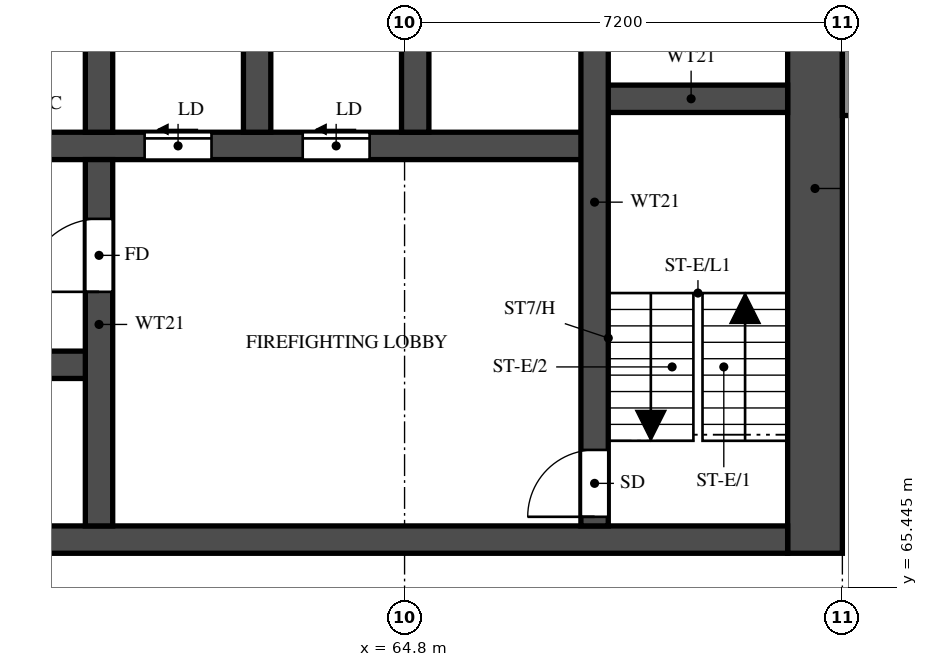
"""IFC4 building model, lengths in metres.
Left out: names, types, materials, properties, quantities, classifications, styles, units other than length and angle.
Written with IfcOpenShell. Run it as: python <this file> out.ifc"""

import sys

from ifc_helpers import new_model, si_unit, direction, frame, frame_2d, origin, place, context, subcontext, project, spatial, rectangle, extrude, element, fill, save


model = new_model("IFC4")
c1 = context("Model", 3, precision=1e-05, world=origin(), true_north=direction((0.0, 1.0)))
c2 = subcontext(c1, "Body", "Model", "MODEL_VIEW")
j1 = project(units=[si_unit("LENGTHUNIT", "METRE"), si_unit("PLANEANGLEUNIT", "RADIAN")], contexts=[c1])
p1 = place(None, origin())
s1 = spatial("IfcSite", under=j1, at=p1, CompositionType="ELEMENT")
p2 = place(p1, origin())
s2 = spatial("IfcBuilding", under=s1, at=p2, CompositionType="ELEMENT")
p3 = place(p2, frame((0.0, 0.0, 97.0)))
s3 = spatial("IfcBuildingStorey", under=s2, at=p3, CompositionType="ELEMENT", Elevation=97.0)
p4 = place(p3, frame((71.55, 66.0, 0.0), z_axis=(0.0, 0.0, 1.0), x_axis=(0.0, 1.0, 0.0)))
e1 = element("IfcWall", 1, at=p4, inside=s3, PredefinedType="SHEAR", context=c2, shape_type="SweptSolid", body=[
    extrude(rectangle(XDim=12.0, YDim=0.9, at=frame_2d((6.0, 0.0))), origin(), (0.0, 0.0, 1.0), 3.18),
])
p5 = place(p3, frame((29.7, 66.225, 0.0), z_axis=(0.0, 0.0, 1.0), x_axis=(1.0, 0.0, 0.0)))
e2 = element("IfcWall", 2, at=p5, inside=s3, PredefinedType="SHEAR", context=c2, shape_type="SweptSolid", body=[
    extrude(rectangle(XDim=41.4, YDim=0.45, at=frame_2d((20.7, 0.0))), origin(), (0.0, 0.0, 1.0), 3.18),
])
p6 = place(p5, frame((0.925, 0.0, 0.0)))
e3 = element("IfcOpeningElement", 3, at=p6, cuts=e2, PredefinedType="OPENING", context=c2, shape_type="SweptSolid", body=[
    extrude(rectangle(XDim=1.1, YDim=2.1, at=frame_2d((0.55, 1.05))), frame((0.0, 0.235, 0.0), z_axis=(0.0, -1.0, 0.0), x_axis=(1.0, 0.0, 0.0)), (0.0, 0.0, 1.0), 0.47),
])
p7 = place(p5, frame((3.738, 0.0, 0.0)))
e4 = element("IfcOpeningElement", 4, at=p7, cuts=e2, PredefinedType="OPENING", context=c2, shape_type="SweptSolid", body=[
    extrude(rectangle(XDim=1.8, YDim=2.1, at=frame_2d((0.9, 1.05))), frame((0.0, 0.235, 0.0), z_axis=(0.0, -1.0, 0.0), x_axis=(1.0, 0.0, 0.0)), (0.0, 0.0, 1.0), 0.47),
])
p8 = place(p3, frame((35.575, 69.1, 0.0), z_axis=(0.0, 0.0, 1.0), x_axis=(1.0, 0.0, 0.0)))
e5 = element("IfcWall", 5, at=p8, inside=s3, PredefinedType="SHEAR", context=c2, shape_type="SweptSolid", body=[
    extrude(rectangle(XDim=24.2, YDim=0.45, at=frame_2d((12.1, 0.0))), origin(), (0.0, 0.0, 1.0), 3.18),
])
p9 = place(p8, frame((1.05, 0.0, 0.0)))
e6 = element("IfcOpeningElement", 6, at=p9, cuts=e5, PredefinedType="OPENING", context=c2, shape_type="SweptSolid", body=[
    extrude(rectangle(XDim=1.1, YDim=2.1, at=frame_2d((0.55, 1.05))), frame((0.0, 0.235, 0.0), z_axis=(0.0, -1.0, 0.0), x_axis=(1.0, 0.0, 0.0)), (0.0, 0.0, 1.0), 0.47),
])
p10 = place(p8, frame((3.8, 0.0, 0.0)))
e7 = element("IfcOpeningElement", 7, at=p10, cuts=e5, PredefinedType="OPENING", context=c2, shape_type="SweptSolid", body=[
    extrude(rectangle(XDim=1.1, YDim=2.1, at=frame_2d((0.55, 1.05))), frame((0.0, 0.235, 0.0), z_axis=(0.0, -1.0, 0.0), x_axis=(1.0, 0.0, 0.0)), (0.0, 0.0, 1.0), 0.47),
])
p11 = place(p8, frame((6.55, 0.0, 0.0)))
e8 = element("IfcOpeningElement", 8, at=p11, cuts=e5, PredefinedType="OPENING", context=c2, shape_type="SweptSolid", body=[
    extrude(rectangle(XDim=1.1, YDim=2.1, at=frame_2d((0.55, 1.05))), frame((0.0, 0.235, 0.0), z_axis=(0.0, -1.0, 0.0), x_axis=(1.0, 0.0, 0.0)), (0.0, 0.0, 1.0), 0.47),
])
p12 = place(p8, frame((9.3, 0.0, 0.0)))
e9 = element("IfcOpeningElement", 9, at=p12, cuts=e5, PredefinedType="OPENING", context=c2, shape_type="SweptSolid", body=[
    extrude(rectangle(XDim=1.1, YDim=2.1, at=frame_2d((0.55, 1.05))), frame((0.0, 0.235, 0.0), z_axis=(0.0, -1.0, 0.0), x_axis=(1.0, 0.0, 0.0)), (0.0, 0.0, 1.0), 0.47),
])
p13 = place(p8, frame((12.05, 0.0, 0.0)))
e10 = element("IfcOpeningElement", 10, at=p13, cuts=e5, PredefinedType="OPENING", context=c2, shape_type="SweptSolid", body=[
    extrude(rectangle(XDim=1.1, YDim=2.1, at=frame_2d((0.55, 1.05))), frame((0.0, 0.235, 0.0), z_axis=(0.0, -1.0, 0.0), x_axis=(1.0, 0.0, 0.0)), (0.0, 0.0, 1.0), 0.47),
])
p14 = place(p8, frame((14.8, 0.0, 0.0)))
e11 = element("IfcOpeningElement", 11, at=p14, cuts=e5, PredefinedType="OPENING", context=c2, shape_type="SweptSolid", body=[
    extrude(rectangle(XDim=1.1, YDim=2.1, at=frame_2d((0.55, 1.05))), frame((0.0, 0.235, 0.0), z_axis=(0.0, -1.0, 0.0), x_axis=(1.0, 0.0, 0.0)), (0.0, 0.0, 1.0), 0.47),
])
p15 = place(p3, frame((32.875, 72.7, 0.0), z_axis=(0.0, 0.0, 1.0), x_axis=(1.0, 0.0, 0.0)))
e12 = element("IfcWall", 12, at=p15, inside=s3, PredefinedType="SHEAR", context=c2, shape_type="SweptSolid", body=[
    extrude(rectangle(XDim=35.05, YDim=0.45, at=frame_2d((17.525, 0.0))), origin(), (0.0, 0.0, 1.0), 3.18),
])
p16 = place(p15, frame((19.8, 0.0, 0.0)))
e13 = element("IfcOpeningElement", 13, at=p16, cuts=e12, PredefinedType="OPENING", context=c2, shape_type="SweptSolid", body=[
    extrude(rectangle(XDim=1.1, YDim=2.1, at=frame_2d((0.55, 1.05))), frame((0.0, 0.235, 0.0), z_axis=(0.0, -1.0, 0.0), x_axis=(1.0, 0.0, 0.0)), (0.0, 0.0, 1.0), 0.47),
])
p17 = place(p15, frame((27.65, 0.0, 0.0)))
e14 = element("IfcOpeningElement", 14, at=p17, cuts=e12, PredefinedType="OPENING", context=c2, shape_type="SweptSolid", body=[
    extrude(rectangle(XDim=1.1, YDim=2.1, at=frame_2d((0.55, 1.05))), frame((0.0, 0.235, 0.0), z_axis=(0.0, -1.0, 0.0), x_axis=(1.0, 0.0, 0.0)), (0.0, 0.0, 1.0), 0.47),
])
p18 = place(p15, frame((30.25, 0.0, 0.0)))
e15 = element("IfcOpeningElement", 15, at=p18, cuts=e12, PredefinedType="OPENING", context=c2, shape_type="SweptSolid", body=[
    extrude(rectangle(XDim=1.1, YDim=2.1, at=frame_2d((0.55, 1.05))), frame((0.0, 0.235, 0.0), z_axis=(0.0, -1.0, 0.0), x_axis=(1.0, 0.0, 0.0)), (0.0, 0.0, 1.0), 0.47),
])
p19 = place(p15, frame((3.75, 0.0, 0.0)))
e16 = element("IfcOpeningElement", 16, at=p19, cuts=e12, PredefinedType="OPENING", context=c2, shape_type="SweptSolid", body=[
    extrude(rectangle(XDim=1.1, YDim=2.1, at=frame_2d((0.55, 1.05))), frame((0.0, 0.235, 0.0), z_axis=(0.0, -1.0, 0.0), x_axis=(1.0, 0.0, 0.0)), (0.0, 0.0, 1.0), 0.47),
])
p20 = place(p15, frame((6.5, 0.0, 0.0)))
e17 = element("IfcOpeningElement", 17, at=p20, cuts=e12, PredefinedType="OPENING", context=c2, shape_type="SweptSolid", body=[
    extrude(rectangle(XDim=1.1, YDim=2.1, at=frame_2d((0.55, 1.05))), frame((0.0, 0.235, 0.0), z_axis=(0.0, -1.0, 0.0), x_axis=(1.0, 0.0, 0.0)), (0.0, 0.0, 1.0), 0.47),
])
p21 = place(p15, frame((9.25, 0.0, 0.0)))
e18 = element("IfcOpeningElement", 18, at=p21, cuts=e12, PredefinedType="OPENING", context=c2, shape_type="SweptSolid", body=[
    extrude(rectangle(XDim=1.1, YDim=2.1, at=frame_2d((0.55, 1.05))), frame((0.0, 0.235, 0.0), z_axis=(0.0, -1.0, 0.0), x_axis=(1.0, 0.0, 0.0)), (0.0, 0.0, 1.0), 0.47),
])
p22 = place(p15, frame((12.0, 0.0, 0.0)))
e19 = element("IfcOpeningElement", 19, at=p22, cuts=e12, PredefinedType="OPENING", context=c2, shape_type="SweptSolid", body=[
    extrude(rectangle(XDim=1.1, YDim=2.1, at=frame_2d((0.55, 1.05))), frame((0.0, 0.235, 0.0), z_axis=(0.0, -1.0, 0.0), x_axis=(1.0, 0.0, 0.0)), (0.0, 0.0, 1.0), 0.47),
])
p23 = place(p15, frame((14.75, 0.0, 0.0)))
e20 = element("IfcOpeningElement", 20, at=p23, cuts=e12, PredefinedType="OPENING", context=c2, shape_type="SweptSolid", body=[
    extrude(rectangle(XDim=1.1, YDim=2.1, at=frame_2d((0.55, 1.05))), frame((0.0, 0.235, 0.0), z_axis=(0.0, -1.0, 0.0), x_axis=(1.0, 0.0, 0.0)), (0.0, 0.0, 1.0), 0.47),
])
p24 = place(p15, frame((17.5, 0.0, 0.0)))
e21 = element("IfcOpeningElement", 21, at=p24, cuts=e12, PredefinedType="OPENING", context=c2, shape_type="SweptSolid", body=[
    extrude(rectangle(XDim=1.1, YDim=2.1, at=frame_2d((0.55, 1.05))), frame((0.0, 0.235, 0.0), z_axis=(0.0, -1.0, 0.0), x_axis=(1.0, 0.0, 0.0)), (0.0, 0.0, 1.0), 0.47),
])
p25 = place(p15, frame((0.913, 0.0, 0.0)))
e22 = element("IfcOpeningElement", 22, at=p25, cuts=e12, PredefinedType="OPENING", context=c2, shape_type="SweptSolid", body=[
    extrude(rectangle(XDim=1.1, YDim=2.1, at=frame_2d((0.55, 1.05))), frame((0.0, 0.235, 0.0), z_axis=(0.0, -1.0, 0.0), x_axis=(1.0, 0.0, 0.0)), (0.0, 0.0, 1.0), 0.47),
])
p26 = place(p3, frame((67.925, 73.475, 0.0), z_axis=(0.0, 0.0, 1.0), x_axis=(1.0, 0.0, 0.0)))
e23 = element("IfcWall", 23, at=p26, inside=s3, PredefinedType="SHEAR", context=c2, shape_type="SweptSolid", body=[
    extrude(rectangle(XDim=3.175, YDim=0.45, at=frame_2d((1.587, 0.0))), origin(), (0.0, 0.0, 1.0), 3.18),
])
p27 = place(p3, frame((67.925, 66.45, 0.0), z_axis=(0.0, 0.0, 1.0), x_axis=(0.0, 1.0, 0.0)))
e24 = element("IfcWall", 24, at=p27, inside=s3, PredefinedType="SHEAR", context=c2, shape_type="SweptSolid", body=[
    extrude(rectangle(XDim=10.65, YDim=0.45, at=frame_2d((5.325, 0.0))), origin(), (0.0, 0.0, 1.0), 3.18),
])
p28 = place(p27, frame((0.15, 0.0, 0.0)))
e25 = element("IfcOpeningElement", 25, at=p28, cuts=e24, PredefinedType="OPENING", context=c2, shape_type="SweptSolid", body=[
    extrude(rectangle(XDim=1.1, YDim=2.1, at=frame_2d((0.55, 1.05))), frame((0.0, 0.235, 0.0), z_axis=(0.0, -1.0, 0.0), x_axis=(1.0, 0.0, 0.0)), (0.0, 0.0, 1.0), 0.47),
])
p29 = place(p3, frame((59.775, 66.45, 0.0), z_axis=(0.0, 0.0, 1.0), x_axis=(0.0, 1.0, 0.0)))
e26 = element("IfcWall", 26, at=p29, inside=s3, PredefinedType="SHEAR", context=c2, shape_type="SweptSolid", body=[
    extrude(rectangle(XDim=6.025, YDim=0.45, at=frame_2d((3.013, 0.0))), origin(), (0.0, 0.0, 1.0), 3.18),
])
p30 = place(p29, frame((3.85, 0.0, 0.0)))
e27 = element("IfcOpeningElement", 27, at=p30, cuts=e26, PredefinedType="OPENING", context=c2, shape_type="SweptSolid", body=[
    extrude(rectangle(XDim=1.2, YDim=2.1, at=frame_2d((0.6, 1.05))), frame((0.0, 0.235, 0.0), z_axis=(0.0, -1.0, 0.0), x_axis=(1.0, 0.0, 0.0)), (0.0, 0.0, 1.0), 0.47),
])
for number, where, z_axis, x_axis in (
    (28, (59.775, 72.925, 0.0), (0.0, 0.0, 1.0), (0.0, 1.0, 0.0)),
    (29, (62.375, 72.925, 0.0), (0.0, 0.0, 1.0), (0.0, 1.0, 0.0)),
    (30, (64.975, 72.925, 0.0), (0.0, 0.0, 1.0), (0.0, 1.0, 0.0)),
):
    element("IfcWall", number, at=place(p3, frame(where, z_axis=z_axis, x_axis=x_axis)), inside=s3, PredefinedType="SHEAR", context=c2, shape_type="SweptSolid", body=[
        extrude(rectangle(XDim=2.95, YDim=0.45, at=frame_2d((1.475, 0.0))), origin(), (0.0, 0.0, 1.0), 3.18),
    ])
p31 = place(p3, frame((72.1, 73.2, 0.0), z_axis=(0.0, 0.0, 1.0), x_axis=(0.0, 1.0, 0.0)))
e31 = element("IfcWall", 31, at=p31, inside=s3, PredefinedType="SOLIDWALL", context=c2, shape_type="SweptSolid", body=[
    extrude(rectangle(XDim=4.8, YDim=0.2, at=frame_2d((2.4, 0.0))), origin(), (0.0, 0.0, 1.0), 3.18),
])
p32 = place(p28, origin())
e32 = element("IfcDoor", 32, at=p32, inside=s3, OperationType="SINGLE_SWING_LEFT", PredefinedType="DOOR", context=c2, shape_type="SweptSolid", body=[
    extrude(rectangle(XDim=1.1, YDim=2.1, at=frame_2d((0.55, 1.05))), frame((0.0, 0.025, 0.0), z_axis=(0.0, -1.0, 0.0), x_axis=(1.0, 0.0, 0.0)), (0.0, 0.0, 1.0), 0.05),
])
fill(e25, e32)
p33 = place(p30, origin())
e33 = element("IfcDoor", 33, at=p33, inside=s3, OperationType="SINGLE_SWING_RIGHT", PredefinedType="DOOR", context=c2, shape_type="SweptSolid", body=[
    extrude(rectangle(XDim=1.2, YDim=2.1, at=frame_2d((0.6, 1.05))), frame((0.0, 0.025, 0.0), z_axis=(0.0, -1.0, 0.0), x_axis=(1.0, 0.0, 0.0)), (0.0, 0.0, 1.0), 0.05),
])
fill(e27, e33)
p34 = place(p17, origin())
e34 = element("IfcDoor", 34, at=p34, inside=s3, OperationType="SLIDING_TO_LEFT", PredefinedType="DOOR", context=c2, shape_type="SweptSolid", body=[
    extrude(rectangle(XDim=1.1, YDim=2.1, at=frame_2d((0.55, 1.05))), frame((0.0, 0.025, 0.0), z_axis=(0.0, -1.0, 0.0), x_axis=(1.0, 0.0, 0.0)), (0.0, 0.0, 1.0), 0.05),
])
fill(e14, e34)
p35 = place(p18, origin())
e35 = element("IfcDoor", 35, at=p35, inside=s3, OperationType="SLIDING_TO_LEFT", PredefinedType="DOOR", context=c2, shape_type="SweptSolid", body=[
    extrude(rectangle(XDim=1.1, YDim=2.1, at=frame_2d((0.55, 1.05))), frame((0.0, 0.025, 0.0), z_axis=(0.0, -1.0, 0.0), x_axis=(1.0, 0.0, 0.0)), (0.0, 0.0, 1.0), 0.05),
])
fill(e15, e35)
save(model, sys.argv[1])
